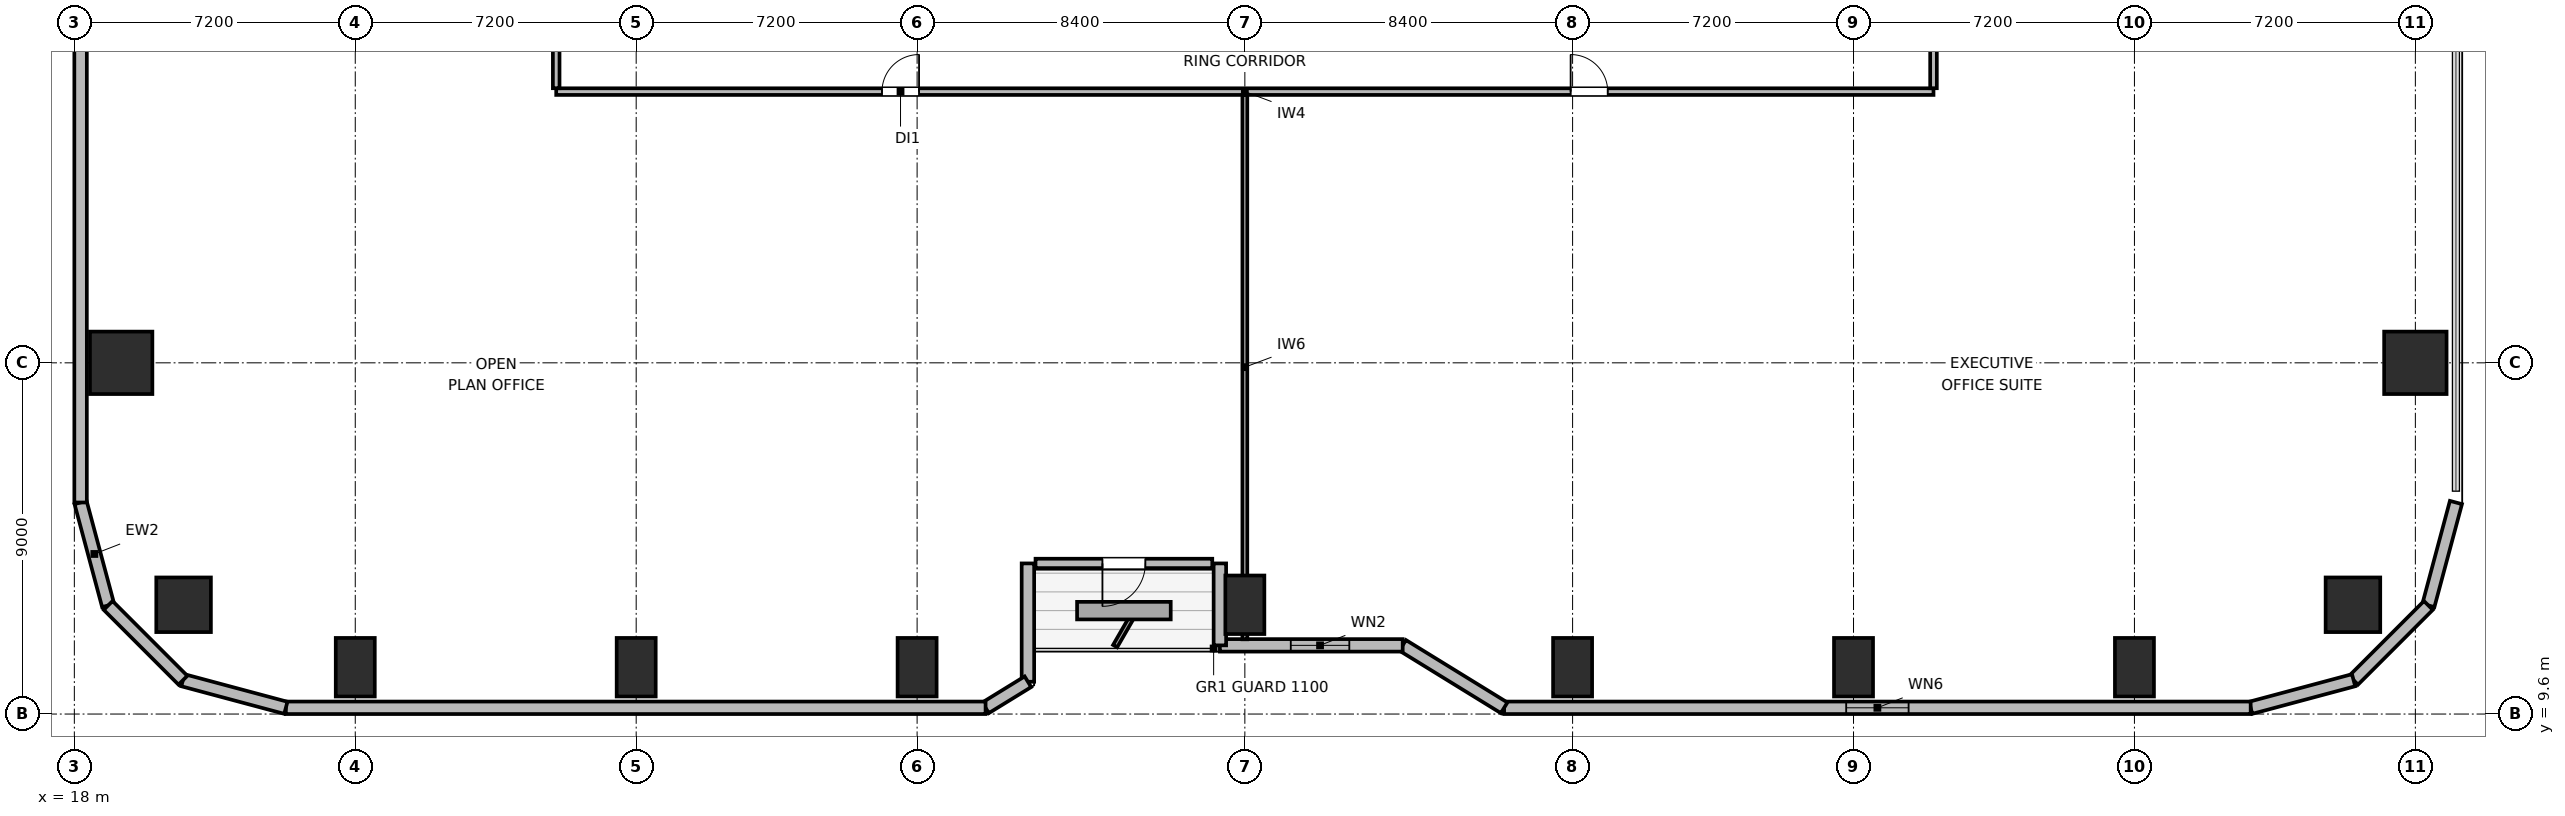
"""IFC4 building model, lengths in metres.
Left out: names, types, materials, properties, quantities, classifications, styles, units other than length and angle.
Written with IfcOpenShell. Run it as: python <this file> out.ifc"""

import sys

from ifc_helpers import new_model, si_unit, direction, frame, frame_2d, origin, origin_2d, place, context, subcontext, project, spatial, rectangle, circle, extrude, element, fill, save


model = new_model("IFC4")
c1 = context("Model", 3, precision=1e-05, world=origin(), true_north=direction((0.0, 1.0)))
c2 = subcontext(c1, "Body", "Model", "MODEL_VIEW")
j1 = project(units=[si_unit("LENGTHUNIT", "METRE"), si_unit("PLANEANGLEUNIT", "RADIAN")], contexts=[c1])
p1 = place(None, origin())
s1 = spatial("IfcSite", under=j1, at=p1, CompositionType="ELEMENT")
p2 = place(p1, origin())
s2 = spatial("IfcBuilding", under=s1, at=p2, CompositionType="ELEMENT")
p3 = place(p2, frame((0.0, 0.0, 29.4)))
s3 = spatial("IfcBuildingStorey", under=s2, at=p3, CompositionType="ELEMENT", Elevation=29.4)
for number, where, z_axis, x_axis in (
    (1, (20.8, 12.4, 0.0), (0.0, 0.0, 1.0), (1.0, 0.0, 0.0)),
    (2, (76.4, 12.4, 0.0), (0.0, 0.0, 1.0), (1.0, 0.0, 0.0)),
):
    element("IfcColumn", number, at=place(p3, frame(where, z_axis=z_axis, x_axis=x_axis)), inside=s3, PredefinedType="COLUMN", context=c2, shape_type="SweptSolid", body=[
        extrude(circle(Radius=0.7, at=origin_2d()), origin(), (0.0, 0.0, 1.0), 3.9),
    ])
for number, where, z_axis, x_axis in (
    (3, (25.2, 10.8, 0.0), (0.0, 0.0, 1.0), (1.0, 0.0, 0.0)),
    (4, (32.4, 10.8, 0.0), (0.0, 0.0, 1.0), (1.0, 0.0, 0.0)),
    (5, (39.6, 10.8, 0.0), (0.0, 0.0, 1.0), (1.0, 0.0, 0.0)),
    (6, (48.0, 12.4, 0.0), (0.0, 0.0, 1.0), (1.0, 0.0, 0.0)),
    (7, (56.4, 10.8, 0.0), (0.0, 0.0, 1.0), (1.0, 0.0, 0.0)),
    (8, (63.6, 10.8, 0.0), (0.0, 0.0, 1.0), (1.0, 0.0, 0.0)),
    (9, (70.8, 10.8, 0.0), (0.0, 0.0, 1.0), (1.0, 0.0, 0.0)),
):
    element("IfcColumn", number, at=place(p3, frame(where, z_axis=z_axis, x_axis=x_axis)), inside=s3, PredefinedType="COLUMN", context=c2, shape_type="SweptSolid", body=[
        extrude(rectangle(XDim=1.0, YDim=1.5, at=origin_2d()), origin(), (0.0, 0.0, 1.0), 3.9),
    ])
for number, where, z_axis, x_axis in (
    (10, (19.2, 18.6, 0.0), (0.0, 0.0, 1.0), (1.0, 0.0, 0.0)),
    (11, (78.0, 18.6, 0.0), (0.0, 0.0, 1.0), (1.0, 0.0, 0.0)),
):
    element("IfcColumn", number, at=place(p3, frame(where, z_axis=z_axis, x_axis=x_axis)), inside=s3, PredefinedType="COLUMN", context=c2, shape_type="SweptSolid", body=[
        extrude(rectangle(XDim=1.6, YDim=1.6, at=origin_2d()), origin(), (0.0, 0.0, 1.0), 3.9),
    ])
p4 = place(p3, frame((18.866, 12.383, 0.0), z_axis=(0.0, 0.0, 1.0), x_axis=(-0.25869736047, 0.965958423373, 0.0)))
e12 = element("IfcWall", 12, at=p4, inside=s3, PredefinedType="SOLIDWALL", context=c2, shape_type="SweptSolid", body=[
    extrude(rectangle(XDim=2.731, YDim=0.32, at=frame_2d((1.366, 0.0))), origin(), (0.0, 0.0, 1.0), 3.64),
])
p5 = place(p3, frame((18.16, 15.021, 0.0), z_axis=(0.0, 0.0, 1.0), x_axis=(0.0, 1.0, 0.0)))
e13 = element("IfcWall", 13, at=p5, inside=s3, PredefinedType="SOLIDWALL", context=c2, shape_type="SweptSolid", body=[
    extrude(rectangle(XDim=14.219, YDim=0.32, at=frame_2d((7.109, 0.0))), origin(), (0.0, 0.0, 1.0), 3.64),
])
p6 = place(p3, frame((79.04, 15.021, 0.0), z_axis=(0.0, 0.0, 1.0), x_axis=(-0.25869736047, -0.965958423373, 0.0)))
e14 = element("IfcWall", 14, at=p6, inside=s3, PredefinedType="SOLIDWALL", context=c2, shape_type="SweptSolid", body=[
    extrude(rectangle(XDim=2.731, YDim=0.32, at=frame_2d((1.366, 0.0))), origin(), (0.0, 0.0, 1.0), 3.64),
])
p7 = place(p3, frame((78.333, 12.383, 0.0), z_axis=(0.0, 0.0, 1.0), x_axis=(-0.707106781187, -0.707106781187, 0.0)))
e15 = element("IfcWall", 15, at=p7, inside=s3, PredefinedType="SOLIDWALL", context=c2, shape_type="SweptSolid", body=[
    extrude(rectangle(XDim=2.71, YDim=0.32, at=frame_2d((1.355, 0.0))), origin(), (0.0, 0.0, 1.0), 3.64),
])
p8 = place(p3, frame((76.417, 10.467, 0.0), z_axis=(0.0, 0.0, 1.0), x_axis=(-0.965964405026, -0.25867502435, 0.0)))
e16 = element("IfcWall", 16, at=p8, inside=s3, PredefinedType="SOLIDWALL", context=c2, shape_type="SweptSolid", body=[
    extrude(rectangle(XDim=2.731, YDim=0.32, at=frame_2d((1.366, 0.0))), origin(), (0.0, 0.0, 1.0), 3.64),
])
p9 = place(p3, frame((73.779, 9.76, 0.0), z_axis=(0.0, 0.0, 1.0), x_axis=(-1.0, 0.0, 0.0)))
e17 = element("IfcWall", 17, at=p9, inside=s3, PredefinedType="SOLIDWALL", context=c2, shape_type="SweptSolid", body=[
    extrude(rectangle(XDim=19.134, YDim=0.32, at=frame_2d((9.567, 0.0))), origin(), (0.0, 0.0, 1.0), 3.64),
])
p10 = place(p9, frame((8.767, 0.0, 0.85)))
e18 = element("IfcOpeningElement", 18, at=p10, cuts=e17, PredefinedType="OPENING", context=c2, shape_type="SweptSolid", body=[
    extrude(rectangle(XDim=1.6, YDim=1.0, at=frame_2d((0.8, 0.5))), frame((0.0, 0.17, 0.0), z_axis=(0.0, -1.0, 0.0), x_axis=(1.0, 0.0, 0.0)), (0.0, 0.0, 1.0), 0.34),
])
p11 = place(p3, frame((54.645, 9.76, 0.0), z_axis=(0.0, 0.0, 1.0), x_axis=(-0.851630857047, 0.524142044989, 0.0)))
e19 = element("IfcWall", 19, at=p11, inside=s3, PredefinedType="SOLIDWALL", context=c2, shape_type="SweptSolid", body=[
    extrude(rectangle(XDim=3.053, YDim=0.32, at=frame_2d((1.526, 0.0))), origin(), (0.0, 0.0, 1.0), 2.875),
])
p12 = place(p3, frame((52.045, 11.36, 0.0), z_axis=(0.0, 0.0, 1.0), x_axis=(-1.0, 0.0, 0.0)))
e20 = element("IfcWall", 20, at=p12, inside=s3, PredefinedType="SOLIDWALL", context=c2, shape_type="SweptSolid", body=[
    extrude(rectangle(XDim=4.685, YDim=0.32, at=frame_2d((2.343, 0.0))), origin(), (0.0, 0.0, 1.0), 2.875),
])
p13 = place(p12, frame((1.368, 0.0, 0.85)))
e21 = element("IfcOpeningElement", 21, at=p13, cuts=e20, PredefinedType="OPENING", context=c2, shape_type="SweptSolid", body=[
    extrude(rectangle(XDim=1.5, YDim=1.1, at=frame_2d((0.75, 0.55))), frame((0.0, 0.17, 0.0), z_axis=(0.0, -1.0, 0.0), x_axis=(1.0, 0.0, 0.0)), (0.0, 0.0, 1.0), 0.34),
])
p14 = place(p3, frame((47.36, 11.36, 0.0), z_axis=(0.0, 0.0, 1.0), x_axis=(0.0, 1.0, 0.0)))
e22 = element("IfcWall", 22, at=p14, inside=s3, PredefinedType="SOLIDWALL", context=c2, shape_type="SweptSolid", body=[
    extrude(rectangle(XDim=2.1, YDim=0.32, at=frame_2d((1.05, 0.0))), origin(), (0.0, 0.0, 1.0), 2.875),
])
p15 = place(p3, frame((47.165, 13.46, 0.0), z_axis=(0.0, 0.0, 1.0), x_axis=(-1.0, 0.0, 0.0)))
e23 = element("IfcWall", 23, at=p15, inside=s3, PredefinedType="SOLIDWALL", context=c2, shape_type="SweptSolid", body=[
    extrude(rectangle(XDim=4.53, YDim=0.24, at=frame_2d((2.265, 0.0))), origin(), (0.0, 0.0, 1.0), 3.64),
])
p16 = place(p15, frame((1.715, 0.0, 0.0)))
e24 = element("IfcOpeningElement", 24, at=p16, cuts=e23, PredefinedType="OPENING", context=c2, shape_type="SweptSolid", body=[
    extrude(rectangle(XDim=1.1, YDim=2.04, at=frame_2d((0.55, 1.02))), frame((0.0, 0.13, 0.0), z_axis=(0.0, -1.0, 0.0), x_axis=(1.0, 0.0, 0.0)), (0.0, 0.0, 1.0), 0.26),
])
p17 = place(p3, frame((42.44, 13.46, 0.0), z_axis=(0.0, 0.0, 1.0), x_axis=(0.0, -1.0, 0.0)))
e25 = element("IfcWall", 25, at=p17, inside=s3, PredefinedType="SOLIDWALL", context=c2, shape_type="SweptSolid", body=[
    extrude(rectangle(XDim=3.032, YDim=0.32, at=frame_2d((1.516, 0.0))), origin(), (0.0, 0.0, 1.0), 2.875),
])
p18 = place(p3, frame((42.44, 10.427, 0.0), z_axis=(0.0, 0.0, 1.0), x_axis=(-0.851776724646, -0.523904964045, 0.0)))
e26 = element("IfcWall", 26, at=p18, inside=s3, PredefinedType="SOLIDWALL", context=c2, shape_type="SweptSolid", body=[
    extrude(rectangle(XDim=1.274, YDim=0.32, at=frame_2d((0.637, 0.0))), origin(), (0.0, 0.0, 1.0), 3.64),
])
p19 = place(p3, frame((41.355, 9.76, 0.0), z_axis=(0.0, 0.0, 1.0), x_axis=(-1.0, 0.0, 0.0)))
e27 = element("IfcWall", 27, at=p19, inside=s3, PredefinedType="SOLIDWALL", context=c2, shape_type="SweptSolid", body=[
    extrude(rectangle(XDim=17.934, YDim=0.32, at=frame_2d((8.967, 0.0))), origin(), (0.0, 0.0, 1.0), 3.64),
])
p20 = place(p3, frame((23.421, 9.76, 0.0), z_axis=(0.0, 0.0, 1.0), x_axis=(-0.965964405026, 0.25867502435, 0.0)))
e28 = element("IfcWall", 28, at=p20, inside=s3, PredefinedType="SOLIDWALL", context=c2, shape_type="SweptSolid", body=[
    extrude(rectangle(XDim=2.731, YDim=0.32, at=frame_2d((1.366, 0.0))), origin(), (0.0, 0.0, 1.0), 3.64),
])
p21 = place(p3, frame((20.783, 10.467, 0.0), z_axis=(0.0, 0.0, 1.0), x_axis=(-0.707106781187, 0.707106781187, 0.0)))
e29 = element("IfcWall", 29, at=p21, inside=s3, PredefinedType="SOLIDWALL", context=c2, shape_type="SweptSolid", body=[
    extrude(rectangle(XDim=2.71, YDim=0.32, at=frame_2d((1.355, 0.0))), origin(), (0.0, 0.0, 1.0), 3.64),
])
p22 = place(p3, frame((30.35, 25.55, 0.0), z_axis=(0.0, 0.0, 1.0), x_axis=(1.0, 0.0, 0.0)))
e30 = element("IfcWall", 30, at=p22, inside=s3, PredefinedType="PARTITIONING", context=c2, shape_type="SweptSolid", body=[
    extrude(rectangle(XDim=35.3, YDim=0.17, at=frame_2d((17.65, 0.0))), origin(), (0.0, 0.0, 1.0), 3.64),
])
p23 = place(p22, frame((8.35, 0.0, 0.0)))
e31 = element("IfcOpeningElement", 31, at=p23, cuts=e30, PredefinedType="OPENING", context=c2, shape_type="SweptSolid", body=[
    extrude(rectangle(XDim=0.95, YDim=2.04, at=frame_2d((0.475, 1.02))), frame((0.0, 0.095, 0.0), z_axis=(0.0, -1.0, 0.0), x_axis=(1.0, 0.0, 0.0)), (0.0, 0.0, 1.0), 0.19),
])
p24 = place(p22, frame((26.0, 0.0, 0.0)))
e32 = element("IfcOpeningElement", 32, at=p24, cuts=e30, PredefinedType="OPENING", context=c2, shape_type="SweptSolid", body=[
    extrude(rectangle(XDim=0.95, YDim=2.04, at=frame_2d((0.475, 1.02))), frame((0.0, 0.095, 0.0), z_axis=(0.0, -1.0, 0.0), x_axis=(1.0, 0.0, 0.0)), (0.0, 0.0, 1.0), 0.19),
])
p25 = place(p3, frame((30.35, 25.637, 0.0), z_axis=(0.0, 0.0, 1.0), x_axis=(0.0, 1.0, 0.0)))
e33 = element("IfcWall", 33, at=p25, inside=s3, PredefinedType="PARTITIONING", context=c2, shape_type="SweptSolid", body=[
    extrude(rectangle(XDim=20.726, YDim=0.17, at=frame_2d((10.363, 0.0))), origin(), (0.0, 0.0, 1.0), 3.64),
])
p26 = place(p25, frame((4.263, 0.0, 0.0)))
e34 = element("IfcOpeningElement", 34, at=p26, cuts=e33, PredefinedType="OPENING", context=c2, shape_type="SweptSolid", body=[
    extrude(rectangle(XDim=0.95, YDim=2.04, at=frame_2d((0.475, 1.02))), frame((0.0, 0.095, 0.0), z_axis=(0.0, -1.0, 0.0), x_axis=(1.0, 0.0, 0.0)), (0.0, 0.0, 1.0), 0.19),
])
p27 = place(p25, frame((14.713, 0.0, 0.0)))
e35 = element("IfcOpeningElement", 35, at=p27, cuts=e33, PredefinedType="OPENING", context=c2, shape_type="SweptSolid", body=[
    extrude(rectangle(XDim=0.95, YDim=2.04, at=frame_2d((0.475, 1.02))), frame((0.0, 0.095, 0.0), z_axis=(0.0, -1.0, 0.0), x_axis=(1.0, 0.0, 0.0)), (0.0, 0.0, 1.0), 0.19),
])
p28 = place(p3, frame((65.65, 25.637, 0.0), z_axis=(0.0, 0.0, 1.0), x_axis=(0.0, 1.0, 0.0)))
e36 = element("IfcWall", 36, at=p28, inside=s3, PredefinedType="PARTITIONING", context=c2, shape_type="SweptSolid", body=[
    extrude(rectangle(XDim=20.726, YDim=0.17, at=frame_2d((10.363, 0.0))), origin(), (0.0, 0.0, 1.0), 3.64),
])
p29 = place(p28, frame((4.163, 0.0, 0.0)))
e37 = element("IfcOpeningElement", 37, at=p29, cuts=e36, PredefinedType="OPENING", context=c2, shape_type="SweptSolid", body=[
    extrude(rectangle(XDim=0.95, YDim=2.04, at=frame_2d((0.475, 1.02))), frame((0.0, 0.095, 0.0), z_axis=(0.0, -1.0, 0.0), x_axis=(1.0, 0.0, 0.0)), (0.0, 0.0, 1.0), 0.19),
])
p30 = place(p28, frame((14.613, 0.0, 0.0)))
e38 = element("IfcOpeningElement", 38, at=p30, cuts=e36, PredefinedType="OPENING", context=c2, shape_type="SweptSolid", body=[
    extrude(rectangle(XDim=0.95, YDim=2.04, at=frame_2d((0.475, 1.02))), frame((0.0, 0.095, 0.0), z_axis=(0.0, -1.0, 0.0), x_axis=(1.0, 0.0, 0.0)), (0.0, 0.0, 1.0), 0.19),
])
p31 = place(p3, frame((48.0, 11.515, 0.0), z_axis=(0.0, 0.0, 1.0), x_axis=(0.0, 1.0, 0.0)))
e39 = element("IfcWall", 39, at=p31, inside=s3, PredefinedType="PARTITIONING", context=c2, shape_type="SweptSolid", body=[
    extrude(rectangle(XDim=13.948, YDim=0.125, at=frame_2d((6.974, 0.0))), origin(), (0.0, 0.0, 1.0), 2.93),
])
p32 = place(p10, origin())
e40 = element("IfcWindow", 40, at=p32, inside=s3, PartitioningType="SINGLE_PANEL", PredefinedType="WINDOW", context=c2, shape_type="SweptSolid", body=[
    extrude(rectangle(XDim=1.6, YDim=1.0, at=frame_2d((0.8, 0.5))), frame((0.0, 0.03, 0.0), z_axis=(0.0, -1.0, 0.0), x_axis=(1.0, 0.0, 0.0)), (0.0, 0.0, 1.0), 0.06),
])
fill(e18, e40)
p33 = place(p13, origin())
e41 = element("IfcWindow", 41, at=p33, inside=s3, PartitioningType="SINGLE_PANEL", PredefinedType="WINDOW", context=c2, shape_type="SweptSolid", body=[
    extrude(rectangle(XDim=1.5, YDim=1.1, at=frame_2d((0.75, 0.55))), frame((0.0, 0.03, 0.0), z_axis=(0.0, -1.0, 0.0), x_axis=(1.0, 0.0, 0.0)), (0.0, 0.0, 1.0), 0.06),
])
fill(e21, e41)
p34 = place(p16, origin())
e42 = element("IfcDoor", 42, at=p34, inside=s3, OperationType="SINGLE_SWING_RIGHT", PredefinedType="DOOR", context=c2, shape_type="SweptSolid", body=[
    extrude(rectangle(XDim=1.1, YDim=2.04, at=frame_2d((0.55, 1.02))), frame((0.0, 0.025, 0.0), z_axis=(0.0, -1.0, 0.0), x_axis=(1.0, 0.0, 0.0)), (0.0, 0.0, 1.0), 0.05),
])
fill(e24, e42)
p35 = place(p23, origin())
e43 = element("IfcDoor", 43, at=p35, inside=s3, OperationType="SINGLE_SWING_RIGHT", PredefinedType="DOOR", context=c2, shape_type="SweptSolid", body=[
    extrude(rectangle(XDim=0.95, YDim=2.04, at=frame_2d((0.475, 1.02))), frame((0.0, 0.025, 0.0), z_axis=(0.0, -1.0, 0.0), x_axis=(1.0, 0.0, 0.0)), (0.0, 0.0, 1.0), 0.05),
])
fill(e31, e43)
p36 = place(p24, origin())
e44 = element("IfcDoor", 44, at=p36, inside=s3, OperationType="SINGLE_SWING_LEFT", PredefinedType="DOOR", context=c2, shape_type="SweptSolid", body=[
    extrude(rectangle(XDim=0.95, YDim=2.04, at=frame_2d((0.475, 1.02))), frame((0.0, 0.025, 0.0), z_axis=(0.0, -1.0, 0.0), x_axis=(1.0, 0.0, 0.0)), (0.0, 0.0, 1.0), 0.05),
])
fill(e32, e44)
save(model, sys.argv[1])
